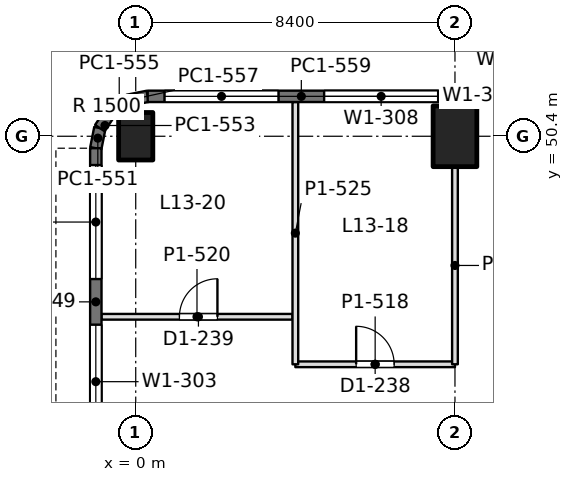
"""IFC4 building model, lengths in metres.
Left out: names, types, materials, properties, quantities, classifications, styles, units other than length and angle.
Written with IfcOpenShell. Run it as: python <this file> out.ifc"""

import sys

from ifc_helpers import new_model, si_unit, direction, frame, frame_2d, origin, origin_2d, place, context, subcontext, project, spatial, rectangle, extrude, element, fill, save


model = new_model("IFC4")
c1 = context("Model", 3, precision=1e-05, world=origin(), true_north=direction((0.0, 1.0)))
c2 = subcontext(c1, "Body", "Model", "MODEL_VIEW")
j1 = project(units=[si_unit("LENGTHUNIT", "METRE"), si_unit("PLANEANGLEUNIT", "RADIAN")], contexts=[c1])
p1 = place(None, origin())
s1 = spatial("IfcSite", under=j1, at=p1, CompositionType="ELEMENT")
p2 = place(p1, origin())
s2 = spatial("IfcBuilding", under=s1, at=p2, CompositionType="ELEMENT")
p3 = place(p2, frame((0.0, 0.0, 59.4)))
s3 = spatial("IfcBuildingStorey", under=s2, at=p3, CompositionType="ELEMENT", Elevation=59.4)
p4 = place(p3, frame((0.0, 50.4, 0.0), z_axis=(0.0, 0.0, 1.0), x_axis=(1.0, 0.0, 0.0)))
e1 = element("IfcColumn", 1, at=p4, inside=s3, PredefinedType="COLUMN", context=c2, shape_type="SweptSolid", body=[
    extrude(rectangle(XDim=0.9, YDim=1.25, at=origin_2d()), origin(), (0.0, 0.0, 1.0), 4.5),
])
p5 = place(p3, frame((8.4, 50.4, 0.0), z_axis=(0.0, 0.0, 1.0), x_axis=(1.0, 0.0, 0.0)))
e2 = element("IfcColumn", 2, at=p5, inside=s3, PredefinedType="COLUMN", context=c2, shape_type="SweptSolid", body=[
    extrude(rectangle(XDim=1.15, YDim=1.6, at=origin_2d()), origin(), (0.0, 0.0, 1.0), 4.5),
])
p6 = place(p3, frame((-1.05, 42.0, 0.0), z_axis=(0.0, 0.0, 1.0), x_axis=(0.0, 1.0, 0.0)))
e3 = element("IfcWall", 3, at=p6, inside=s3, PredefinedType="SOLIDWALL", context=c2, shape_type="SweptSolid", body=[
    extrude(rectangle(XDim=8.085, YDim=0.3, at=frame_2d((4.042, 0.0))), origin(), (0.0, 0.0, 1.0), 4.34),
])
p7 = place(p6, frame((0.443, 0.0, 0.9)))
e4 = element("IfcOpeningElement", 4, at=p7, cuts=e3, PredefinedType="OPENING", context=c2, shape_type="SweptSolid", body=[
    extrude(rectangle(XDim=3.0, YDim=1.9, at=frame_2d((1.5, 0.95))), frame((0.0, 0.16, 0.0), z_axis=(0.0, -1.0, 0.0), x_axis=(1.0, 0.0, 0.0)), (0.0, 0.0, 1.0), 0.32),
])
p8 = place(p6, frame((4.643, 0.0, 0.9)))
e5 = element("IfcOpeningElement", 5, at=p8, cuts=e3, PredefinedType="OPENING", context=c2, shape_type="SweptSolid", body=[
    extrude(rectangle(XDim=3.0, YDim=1.9, at=frame_2d((1.5, 0.95))), frame((0.0, 0.16, 0.0), z_axis=(0.0, -1.0, 0.0), x_axis=(1.0, 0.0, 0.0)), (0.0, 0.0, 1.0), 0.32),
])
p9 = place(p3, frame((-1.05, 50.085, 0.0), z_axis=(0.0, 0.0, 1.0), x_axis=(0.195073962632, 0.980788534345, 0.0)))
e6 = element("IfcWall", 6, at=p9, inside=s3, PredefinedType="SOLIDWALL", context=c2, shape_type="SweptSolid", body=[
    extrude(rectangle(XDim=0.541, YDim=0.3, at=frame_2d((0.271, 0.0))), origin(), (0.0, 0.0, 1.0), 4.34),
])
for number, where, z_axis, x_axis in (
    (7, (-0.945, 50.615, 0.0), (0.0, 0.0, 1.0), (0.556, 0.831, 0.0)),
    (8, (-0.653, 51.052, 0.0), (0.0, 0.0, 1.0), (0.831, 0.556, 0.0)),
):
    element("IfcWall", number, at=place(p3, frame(where, z_axis=z_axis, x_axis=x_axis)), inside=s3, PredefinedType="SOLIDWALL", context=c2, shape_type="SweptSolid", body=[
        extrude(rectangle(XDim=0.526, YDim=0.3, at=frame_2d((0.263, 0.0))), origin(), (0.0, 0.0, 1.0), 4.34),
    ])
p10 = place(p3, frame((-0.216, 51.344, 0.0), z_axis=(0.0, 0.0, 1.0), x_axis=(0.980788534345, 0.195073962632, 0.0)))
e9 = element("IfcWall", 9, at=p10, inside=s3, PredefinedType="SOLIDWALL", context=c2, shape_type="SweptSolid", body=[
    extrude(rectangle(XDim=0.541, YDim=0.3, at=frame_2d((0.271, 0.0))), origin(), (0.0, 0.0, 1.0), 4.34),
])
p11 = place(p3, frame((0.315, 51.45, 0.0), z_axis=(0.0, 0.0, 1.0), x_axis=(1.0, 0.0, 0.0)))
e10 = element("IfcWall", 10, at=p11, inside=s3, PredefinedType="SOLIDWALL", context=c2, shape_type="SweptSolid", body=[
    extrude(rectangle(XDim=8.085, YDim=0.3, at=frame_2d((4.042, 0.0))), origin(), (0.0, 0.0, 1.0), 4.34),
])
p12 = place(p11, frame((0.443, 0.0, 0.9)))
e11 = element("IfcOpeningElement", 11, at=p12, cuts=e10, PredefinedType="OPENING", context=c2, shape_type="SweptSolid", body=[
    extrude(rectangle(XDim=3.0, YDim=1.9, at=frame_2d((1.5, 0.95))), frame((0.0, 0.16, 0.0), z_axis=(0.0, -1.0, 0.0), x_axis=(1.0, 0.0, 0.0)), (0.0, 0.0, 1.0), 0.32),
])
p13 = place(p11, frame((4.643, 0.0, 0.9)))
e12 = element("IfcOpeningElement", 12, at=p13, cuts=e10, PredefinedType="OPENING", context=c2, shape_type="SweptSolid", body=[
    extrude(rectangle(XDim=3.0, YDim=1.9, at=frame_2d((1.5, 0.95))), frame((0.0, 0.16, 0.0), z_axis=(0.0, -1.0, 0.0), x_axis=(1.0, 0.0, 0.0)), (0.0, 0.0, 1.0), 0.32),
])
p14 = place(p3, frame((8.4, 51.45, 0.0), z_axis=(0.0, 0.0, 1.0), x_axis=(1.0, 0.0, 0.0)))
e13 = element("IfcWall", 13, at=p14, inside=s3, PredefinedType="SOLIDWALL", context=c2, shape_type="SweptSolid", body=[
    extrude(rectangle(XDim=8.4, YDim=0.3, at=frame_2d((4.2, 0.0))), origin(), (0.0, 0.0, 1.0), 4.34),
])
p15 = place(p14, frame((0.6, 0.0, 0.9)))
e14 = element("IfcOpeningElement", 14, at=p15, cuts=e13, PredefinedType="OPENING", context=c2, shape_type="SweptSolid", body=[
    extrude(rectangle(XDim=3.0, YDim=1.9, at=frame_2d((1.5, 0.95))), frame((0.0, 0.16, 0.0), z_axis=(0.0, -1.0, 0.0), x_axis=(1.0, 0.0, 0.0)), (0.0, 0.0, 1.0), 0.32),
])
p16 = place(p14, frame((4.8, 0.0, 0.9)))
e15 = element("IfcOpeningElement", 15, at=p16, cuts=e13, PredefinedType="OPENING", context=c2, shape_type="SweptSolid", body=[
    extrude(rectangle(XDim=3.0, YDim=1.9, at=frame_2d((1.5, 0.95))), frame((0.0, 0.16, 0.0), z_axis=(0.0, -1.0, 0.0), x_axis=(1.0, 0.0, 0.0)), (0.0, 0.0, 1.0), 0.32),
])
p17 = place(p3, frame((-0.902, 45.65, 0.0), z_axis=(0.0, 0.0, 1.0), x_axis=(1.0, 0.0, 0.0)))
e16 = element("IfcWall", 16, at=p17, inside=s3, PredefinedType="PARTITIONING", context=c2, shape_type="SweptSolid", body=[
    extrude(rectangle(XDim=5.028, YDim=0.15, at=frame_2d((2.514, 0.0))), origin(), (0.0, 0.0, 1.0), 3.84),
])
p18 = place(p17, frame((2.052, 0.0, 0.0)))
e17 = element("IfcOpeningElement", 17, at=p18, cuts=e16, PredefinedType="OPENING", context=c2, shape_type="SweptSolid", body=[
    extrude(rectangle(XDim=1.0, YDim=2.2, at=frame_2d((0.5, 1.1))), frame((0.0, 0.085, 0.0), z_axis=(0.0, -1.0, 0.0), x_axis=(1.0, 0.0, 0.0)), (0.0, 0.0, 1.0), 0.17),
])
p19 = place(p3, frame((4.2, 44.4, 0.0), z_axis=(0.0, 0.0, 1.0), x_axis=(1.0, 0.0, 0.0)))
e18 = element("IfcWall", 18, at=p19, inside=s3, PredefinedType="PARTITIONING", context=c2, shape_type="SweptSolid", body=[
    extrude(rectangle(XDim=4.2, YDim=0.15, at=frame_2d((2.1, 0.0))), origin(), (0.0, 0.0, 1.0), 3.74),
])
p20 = place(p19, frame((1.6, 0.0, 0.0)))
e19 = element("IfcOpeningElement", 19, at=p20, cuts=e18, PredefinedType="OPENING", context=c2, shape_type="SweptSolid", body=[
    extrude(rectangle(XDim=1.0, YDim=2.2, at=frame_2d((0.5, 1.1))), frame((0.0, 0.085, 0.0), z_axis=(0.0, -1.0, 0.0), x_axis=(1.0, 0.0, 0.0)), (0.0, 0.0, 1.0), 0.17),
])
p21 = place(p3, frame((4.2, 44.4, 0.0), z_axis=(0.0, 0.0, 1.0), x_axis=(0.0, 1.0, 0.0)))
e20 = element("IfcWall", 20, at=p21, inside=s3, PredefinedType="PARTITIONING", context=c2, shape_type="SweptSolid", body=[
    extrude(rectangle(XDim=6.902, YDim=0.15, at=frame_2d((3.451, 0.0))), origin(), (0.0, 0.0, 1.0), 3.84),
])
p22 = place(p3, frame((8.4, 44.4, 0.0), z_axis=(0.0, 0.0, 1.0), x_axis=(0.0, 1.0, 0.0)))
e21 = element("IfcWall", 21, at=p22, inside=s3, PredefinedType="PARTITIONING", context=c2, shape_type="SweptSolid", body=[
    extrude(rectangle(XDim=5.201, YDim=0.15, at=frame_2d((2.601, 0.0))), origin(), (0.0, 0.0, 1.0), 3.74),
])
p23 = place(p7, origin())
e22 = element("IfcWindow", 22, at=p23, inside=s3, PartitioningType="SINGLE_PANEL", PredefinedType="WINDOW", context=c2, shape_type="SweptSolid", body=[
    extrude(rectangle(XDim=3.0, YDim=1.9, at=frame_2d((1.5, 0.95))), frame((0.0, 0.03, 0.0), z_axis=(0.0, -1.0, 0.0), x_axis=(1.0, 0.0, 0.0)), (0.0, 0.0, 1.0), 0.06),
])
fill(e4, e22)
p24 = place(p8, origin())
e23 = element("IfcWindow", 23, at=p24, inside=s3, PartitioningType="SINGLE_PANEL", PredefinedType="WINDOW", context=c2, shape_type="SweptSolid", body=[
    extrude(rectangle(XDim=3.0, YDim=1.9, at=frame_2d((1.5, 0.95))), frame((0.0, 0.03, 0.0), z_axis=(0.0, -1.0, 0.0), x_axis=(1.0, 0.0, 0.0)), (0.0, 0.0, 1.0), 0.06),
])
fill(e5, e23)
p25 = place(p12, origin())
e24 = element("IfcWindow", 24, at=p25, inside=s3, PartitioningType="SINGLE_PANEL", PredefinedType="WINDOW", context=c2, shape_type="SweptSolid", body=[
    extrude(rectangle(XDim=3.0, YDim=1.9, at=frame_2d((1.5, 0.95))), frame((0.0, 0.03, 0.0), z_axis=(0.0, -1.0, 0.0), x_axis=(1.0, 0.0, 0.0)), (0.0, 0.0, 1.0), 0.06),
])
fill(e11, e24)
p26 = place(p13, origin())
e25 = element("IfcWindow", 25, at=p26, inside=s3, PartitioningType="SINGLE_PANEL", PredefinedType="WINDOW", context=c2, shape_type="SweptSolid", body=[
    extrude(rectangle(XDim=3.0, YDim=1.9, at=frame_2d((1.5, 0.95))), frame((0.0, 0.03, 0.0), z_axis=(0.0, -1.0, 0.0), x_axis=(1.0, 0.0, 0.0)), (0.0, 0.0, 1.0), 0.06),
])
fill(e12, e25)
p27 = place(p15, origin())
e26 = element("IfcWindow", 26, at=p27, inside=s3, PartitioningType="SINGLE_PANEL", PredefinedType="WINDOW", context=c2, shape_type="SweptSolid", body=[
    extrude(rectangle(XDim=3.0, YDim=1.9, at=frame_2d((1.5, 0.95))), frame((0.0, 0.03, 0.0), z_axis=(0.0, -1.0, 0.0), x_axis=(1.0, 0.0, 0.0)), (0.0, 0.0, 1.0), 0.06),
])
fill(e14, e26)
p28 = place(p18, origin())
e27 = element("IfcDoor", 27, at=p28, inside=s3, OperationType="SINGLE_SWING_RIGHT", PredefinedType="DOOR", context=c2, shape_type="SweptSolid", body=[
    extrude(rectangle(XDim=1.0, YDim=2.2, at=frame_2d((0.5, 1.1))), frame((0.0, 0.025, 0.0), z_axis=(0.0, -1.0, 0.0), x_axis=(1.0, 0.0, 0.0)), (0.0, 0.0, 1.0), 0.05),
])
fill(e17, e27)
p29 = place(p20, origin())
e28 = element("IfcDoor", 28, at=p29, inside=s3, OperationType="SINGLE_SWING_LEFT", PredefinedType="DOOR", context=c2, shape_type="SweptSolid", body=[
    extrude(rectangle(XDim=1.0, YDim=2.2, at=frame_2d((0.5, 1.1))), frame((0.0, 0.025, 0.0), z_axis=(0.0, -1.0, 0.0), x_axis=(1.0, 0.0, 0.0)), (0.0, 0.0, 1.0), 0.05),
])
fill(e19, e28)
save(model, sys.argv[1])
